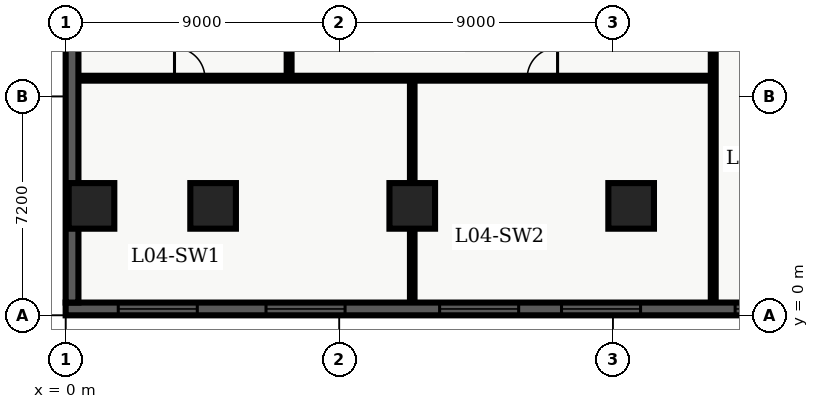
"""IFC4 building model, lengths in metres.
Left out: names, types, materials, properties, quantities, classifications, styles, units other than length and angle.
Written with IfcOpenShell. Run it as: python <this file> out.ifc"""

import sys

from ifc_helpers import new_model, entity, si_unit, converted_unit, direction, frame, origin_with_axes, origin_2d_with_axis, place, context, subcontext, project, spatial, polyline, rectangle, outline, extrude, element, fill, save


model = new_model("IFC4")
c1 = context("Model", 3, precision=1e-05, world=origin_with_axes(), true_north=direction((0.0, 1.0)))
c2 = subcontext(c1, "Body", "Model", "MODEL_VIEW")
j1 = project(units=[si_unit("LENGTHUNIT", "METRE"), converted_unit("PLANEANGLEUNIT", "DEGREE", entity("IfcPlaneAngleMeasure", 0.017), si_unit("PLANEANGLEUNIT", "RADIAN"), dimensions=[0, 0, 0, 0, 0, 0, 0])], contexts=[c1])
p1 = place(None, origin_with_axes())
s1 = spatial("IfcSite", under=j1, at=p1, CompositionType="ELEMENT")
p2 = place(p1, origin_with_axes())
s2 = spatial("IfcBuilding", under=s1, at=p2, CompositionType="ELEMENT")
p3 = place(p2, frame((0.0, 0.0, 19.8), z_axis=(0.0, 0.0, 1.0), x_axis=(1.0, 0.0, 0.0)))
s3 = spatial("IfcBuildingStorey", under=s2, at=p3, CompositionType="ELEMENT", Elevation=19.8)
for number, where, z_axis, x_axis in (
    (1, (11.4, 3.6, 0.0), (0.0, 0.0, 1.0), (1.0, 0.0, 0.0)),
    (2, (18.6, 3.6, 0.0), (0.0, 0.0, 1.0), (1.0, 0.0, 0.0)),
    (3, (4.85, 3.6, 0.0), (0.0, 0.0, 1.0), (1.0, 0.0, 0.0)),
    (4, (0.85, 3.6, 0.0), (0.0, 0.0, 1.0), (1.0, 0.0, 0.0)),
):
    element("IfcColumn", number, at=place(p3, frame(where, z_axis=z_axis, x_axis=x_axis)), inside=s3, PredefinedType="COLUMN", context=c2, shape_type="SweptSolid", body=[
        extrude(rectangle(XDim=1.5, YDim=1.5, at=origin_2d_with_axis()), origin_with_axes(), (0.0, 0.0, 1.0), 4.5),
    ])
p4 = place(p3, frame((0.38, 7.8, 0.0), z_axis=(0.0, 0.0, 1.0), x_axis=(1.0, 0.0, 0.0)))
e5 = element("IfcWall", 5, at=p4, inside=s3, PredefinedType="PARTITIONING", context=c2, shape_type="SweptSolid", body=[
    extrude(outline(polyline([(0.0, -0.08), (20.92, -0.08), (20.92, 0.08), (0.0, 0.08), (0.0, -0.08)])), origin_with_axes(), (0.0, 0.0, 1.0), 3.2),
])
p5 = place(p4, frame((3.7, 0.0, 0.0), z_axis=(0.0, 0.0, 1.0), x_axis=(1.0, 0.0, 0.0)))
e6 = element("IfcOpeningElement", 6, at=p5, cuts=e5, PredefinedType="OPENING", context=c2, shape_type="SweptSolid", body=[
    extrude(rectangle(XDim=1.0, YDim=0.18, at=origin_2d_with_axis()), origin_with_axes(), (0.0, 0.0, 1.0), 2.15),
])
p6 = place(p4, frame((15.3, 0.0, 0.0), z_axis=(0.0, 0.0, 1.0), x_axis=(1.0, 0.0, 0.0)))
e7 = element("IfcOpeningElement", 7, at=p6, cuts=e5, PredefinedType="OPENING", context=c2, shape_type="SweptSolid", body=[
    extrude(rectangle(XDim=1.0, YDim=0.18, at=origin_2d_with_axis()), origin_with_axes(), (0.0, 0.0, 1.0), 2.15),
])
p7 = place(p3, frame((11.4, 0.38, 0.0), z_axis=(0.0, 0.0, 1.0), x_axis=(0.0, 1.0, 0.0)))
e8 = element("IfcWall", 8, at=p7, inside=s3, PredefinedType="PARTITIONING", context=c2, shape_type="SweptSolid", body=[
    extrude(outline(polyline([(0.0, -0.075), (7.42, -0.075), (7.42, 0.075), (0.0, 0.075), (0.0, -0.075)])), origin_with_axes(), (0.0, 0.0, 1.0), 3.2),
])
p8 = place(p3, frame((7.35, 7.8, 0.0), z_axis=(0.0, 0.0, 1.0), x_axis=(0.0, 1.0, 0.0)))
e9 = element("IfcWall", 9, at=p8, inside=s3, PredefinedType="PARTITIONING", context=c2, shape_type="SweptSolid", body=[
    extrude(outline(polyline([(0.0, -0.08), (32.6, -0.08), (32.6, 0.08), (0.0, 0.08), (0.0, -0.08)])), origin_with_axes(), (0.0, 0.0, 1.0), 3.2),
])
p9 = place(p8, frame((8.25, 0.0, 0.0), z_axis=(0.0, 0.0, 1.0), x_axis=(1.0, 0.0, 0.0)))
e10 = element("IfcOpeningElement", 10, at=p9, cuts=e9, PredefinedType="OPENING", context=c2, shape_type="SweptSolid", body=[
    extrude(rectangle(XDim=1.5, YDim=0.18, at=origin_2d_with_axis()), origin_with_axes(), (0.0, 0.0, 1.0), 2.2),
])
p10 = place(p8, frame((21.5, 0.0, 0.0), z_axis=(0.0, 0.0, 1.0), x_axis=(1.0, 0.0, 0.0)))
e11 = element("IfcOpeningElement", 11, at=p10, cuts=e9, PredefinedType="OPENING", context=c2, shape_type="SweptSolid", body=[
    extrude(rectangle(XDim=1.0, YDim=0.18, at=origin_2d_with_axis()), origin_with_axes(), (0.0, 0.0, 1.0), 2.15),
])
p11 = place(p3, frame((21.3, 0.38, 0.0), z_axis=(0.0, 0.0, 1.0), x_axis=(0.0, 1.0, 0.0)))
e12 = element("IfcWall", 12, at=p11, inside=s3, PredefinedType="PARTITIONING", context=c2, shape_type="SweptSolid", body=[
    extrude(outline(polyline([(0.0, -0.08), (35.24, -0.08), (35.24, 0.08), (0.0, 0.08), (0.0, -0.08)])), origin_with_axes(), (0.0, 0.0, 1.0), 3.2),
])
p12 = place(p11, frame((13.025, 0.0, 0.0), z_axis=(0.0, 0.0, 1.0), x_axis=(1.0, 0.0, 0.0)))
e13 = element("IfcOpeningElement", 13, at=p12, cuts=e12, PredefinedType="OPENING", context=c2, shape_type="SweptSolid", body=[
    extrude(rectangle(XDim=1.05, YDim=0.18, at=origin_2d_with_axis()), origin_with_axes(), (0.0, 0.0, 1.0), 2.15),
])
p13 = place(p11, frame((31.25, 0.0, 0.0), z_axis=(0.0, 0.0, 1.0), x_axis=(1.0, 0.0, 0.0)))
e14 = element("IfcOpeningElement", 14, at=p13, cuts=e12, PredefinedType="OPENING", context=c2, shape_type="SweptSolid", body=[
    extrude(rectangle(XDim=1.5, YDim=0.18, at=origin_2d_with_axis()), origin_with_axes(), (0.0, 0.0, 1.0), 2.2),
])
p14 = place(p3, frame((64.38, 0.21, 0.0), z_axis=(0.0, 0.0, 1.0), x_axis=(-1.0, 0.0, 0.0)))
e15 = element("IfcWall", 15, at=p14, inside=s3, PredefinedType="SOLIDWALL", context=c2, shape_type="SweptSolid", body=[
    extrude(outline(polyline([(0.0, -0.21), (64.38, -0.21), (64.38, 0.21), (0.0, 0.21), (0.0, -0.21)])), origin_with_axes(), (0.0, 0.0, 1.0), 4.26),
])
p15 = place(p14, frame((3.03, 0.0, 0.45), z_axis=(0.0, 0.0, 1.0), x_axis=(1.0, 0.0, 0.0)))
e16 = element("IfcOpeningElement", 16, at=p15, cuts=e15, PredefinedType="OPENING", context=c2, shape_type="SweptSolid", body=[
    extrude(rectangle(XDim=2.6, YDim=0.44, at=origin_2d_with_axis()), origin_with_axes(), (0.0, 0.0, 1.0), 2.8),
])
p16 = place(p14, frame((7.89, 0.0, 0.45), z_axis=(0.0, 0.0, 1.0), x_axis=(1.0, 0.0, 0.0)))
e17 = element("IfcOpeningElement", 17, at=p16, cuts=e15, PredefinedType="OPENING", context=c2, shape_type="SweptSolid", body=[
    extrude(rectangle(XDim=2.6, YDim=0.44, at=origin_2d_with_axis()), origin_with_axes(), (0.0, 0.0, 1.0), 2.8),
])
p17 = place(p14, frame((11.9, 0.0, 0.45), z_axis=(0.0, 0.0, 1.0), x_axis=(1.0, 0.0, 0.0)))
e18 = element("IfcOpeningElement", 18, at=p17, cuts=e15, PredefinedType="OPENING", context=c2, shape_type="SweptSolid", body=[
    extrude(rectangle(XDim=2.6, YDim=0.44, at=origin_2d_with_axis()), origin_with_axes(), (0.0, 0.0, 1.0), 2.8),
])
p18 = place(p14, frame((17.61, 0.0, 0.45), z_axis=(0.0, 0.0, 1.0), x_axis=(1.0, 0.0, 0.0)))
e19 = element("IfcOpeningElement", 19, at=p18, cuts=e15, PredefinedType="OPENING", context=c2, shape_type="SweptSolid", body=[
    extrude(rectangle(XDim=2.6, YDim=0.44, at=origin_2d_with_axis()), origin_with_axes(), (0.0, 0.0, 1.0), 2.8),
])
p19 = place(p14, frame((22.47, 0.0, 0.45), z_axis=(0.0, 0.0, 1.0), x_axis=(1.0, 0.0, 0.0)))
e20 = element("IfcOpeningElement", 20, at=p19, cuts=e15, PredefinedType="OPENING", context=c2, shape_type="SweptSolid", body=[
    extrude(rectangle(XDim=2.6, YDim=0.44, at=origin_2d_with_axis()), origin_with_axes(), (0.0, 0.0, 1.0), 2.8),
])
p20 = place(p14, frame((27.33, 0.0, 0.45), z_axis=(0.0, 0.0, 1.0), x_axis=(1.0, 0.0, 0.0)))
e21 = element("IfcOpeningElement", 21, at=p20, cuts=e15, PredefinedType="OPENING", context=c2, shape_type="SweptSolid", body=[
    extrude(rectangle(XDim=2.6, YDim=0.44, at=origin_2d_with_axis()), origin_with_axes(), (0.0, 0.0, 1.0), 2.8),
])
p21 = place(p14, frame((32.19, 0.0, 0.45), z_axis=(0.0, 0.0, 1.0), x_axis=(1.0, 0.0, 0.0)))
e22 = element("IfcOpeningElement", 22, at=p21, cuts=e15, PredefinedType="OPENING", context=c2, shape_type="SweptSolid", body=[
    extrude(rectangle(XDim=2.6, YDim=0.44, at=origin_2d_with_axis()), origin_with_axes(), (0.0, 0.0, 1.0), 2.8),
])
p22 = place(p14, frame((37.05, 0.0, 0.45), z_axis=(0.0, 0.0, 1.0), x_axis=(1.0, 0.0, 0.0)))
e23 = element("IfcOpeningElement", 23, at=p22, cuts=e15, PredefinedType="OPENING", context=c2, shape_type="SweptSolid", body=[
    extrude(rectangle(XDim=2.6, YDim=0.44, at=origin_2d_with_axis()), origin_with_axes(), (0.0, 0.0, 1.0), 2.8),
])
p23 = place(p14, frame((41.06, 0.0, 0.45), z_axis=(0.0, 0.0, 1.0), x_axis=(1.0, 0.0, 0.0)))
e24 = element("IfcOpeningElement", 24, at=p23, cuts=e15, PredefinedType="OPENING", context=c2, shape_type="SweptSolid", body=[
    extrude(rectangle(XDim=2.6, YDim=0.44, at=origin_2d_with_axis()), origin_with_axes(), (0.0, 0.0, 1.0), 2.8),
])
p24 = place(p14, frame((46.77, 0.0, 0.45), z_axis=(0.0, 0.0, 1.0), x_axis=(1.0, 0.0, 0.0)))
e25 = element("IfcOpeningElement", 25, at=p24, cuts=e15, PredefinedType="OPENING", context=c2, shape_type="SweptSolid", body=[
    extrude(rectangle(XDim=2.6, YDim=0.44, at=origin_2d_with_axis()), origin_with_axes(), (0.0, 0.0, 1.0), 2.8),
])
p25 = place(p14, frame((50.78, 0.0, 0.45), z_axis=(0.0, 0.0, 1.0), x_axis=(1.0, 0.0, 0.0)))
e26 = element("IfcOpeningElement", 26, at=p25, cuts=e15, PredefinedType="OPENING", context=c2, shape_type="SweptSolid", body=[
    extrude(rectangle(XDim=2.6, YDim=0.44, at=origin_2d_with_axis()), origin_with_axes(), (0.0, 0.0, 1.0), 2.8),
])
p26 = place(p14, frame((56.49, 0.0, 0.45), z_axis=(0.0, 0.0, 1.0), x_axis=(1.0, 0.0, 0.0)))
e27 = element("IfcOpeningElement", 27, at=p26, cuts=e15, PredefinedType="OPENING", context=c2, shape_type="SweptSolid", body=[
    extrude(rectangle(XDim=2.6, YDim=0.44, at=origin_2d_with_axis()), origin_with_axes(), (0.0, 0.0, 1.0), 2.8),
])
p27 = place(p14, frame((61.35, 0.0, 0.45), z_axis=(0.0, 0.0, 1.0), x_axis=(1.0, 0.0, 0.0)))
e28 = element("IfcOpeningElement", 28, at=p27, cuts=e15, PredefinedType="OPENING", context=c2, shape_type="SweptSolid", body=[
    extrude(rectangle(XDim=2.6, YDim=0.44, at=origin_2d_with_axis()), origin_with_axes(), (0.0, 0.0, 1.0), 2.8),
])
p28 = place(p3, frame((0.21, 0.42, 0.0), z_axis=(0.0, 0.0, 1.0), x_axis=(0.0, 1.0, 0.0)))
e29 = element("IfcWall", 29, at=p28, inside=s3, PredefinedType="SOLIDWALL", context=c2, shape_type="SweptSolid", body=[
    extrude(outline(polyline([(0.0, -0.21), (48.18, -0.21), (48.18, 0.21), (0.0, 0.21), (0.0, -0.21)])), origin_with_axes(), (0.0, 0.0, 1.0), 4.26),
])
p29 = place(p28, frame((13.65, 0.0, 0.45), z_axis=(0.0, 0.0, 1.0), x_axis=(1.0, 0.0, 0.0)))
e30 = element("IfcOpeningElement", 30, at=p29, cuts=e29, PredefinedType="OPENING", context=c2, shape_type="SweptSolid", body=[
    extrude(rectangle(XDim=2.6, YDim=0.44, at=origin_2d_with_axis()), origin_with_axes(), (0.0, 0.0, 1.0), 2.8),
])
p30 = place(p28, frame((24.09, 0.0, 0.45), z_axis=(0.0, 0.0, 1.0), x_axis=(1.0, 0.0, 0.0)))
e31 = element("IfcOpeningElement", 31, at=p30, cuts=e29, PredefinedType="OPENING", context=c2, shape_type="SweptSolid", body=[
    extrude(rectangle(XDim=2.6, YDim=0.44, at=origin_2d_with_axis()), origin_with_axes(), (0.0, 0.0, 1.0), 2.8),
])
p31 = place(p28, frame((28.46, 0.0, 0.45), z_axis=(0.0, 0.0, 1.0), x_axis=(1.0, 0.0, 0.0)))
e32 = element("IfcOpeningElement", 32, at=p31, cuts=e29, PredefinedType="OPENING", context=c2, shape_type="SweptSolid", body=[
    extrude(rectangle(XDim=2.6, YDim=0.44, at=origin_2d_with_axis()), origin_with_axes(), (0.0, 0.0, 1.0), 2.8),
])
p32 = place(p28, frame((34.53, 0.0, 0.45), z_axis=(0.0, 0.0, 1.0), x_axis=(1.0, 0.0, 0.0)))
e33 = element("IfcOpeningElement", 33, at=p32, cuts=e29, PredefinedType="OPENING", context=c2, shape_type="SweptSolid", body=[
    extrude(rectangle(XDim=2.6, YDim=0.44, at=origin_2d_with_axis()), origin_with_axes(), (0.0, 0.0, 1.0), 2.8),
])
p33 = place(p4, frame((3.7, 0.0, 0.0), z_axis=(0.0, 0.0, 1.0), x_axis=(1.0, 0.0, 0.0)))
e34 = element("IfcDoor", 34, at=p33, inside=s3, OperationType="SINGLE_SWING_LEFT", PredefinedType="DOOR", context=c2, shape_type="SweptSolid", body=[
    extrude(rectangle(XDim=1.0, YDim=0.09, at=origin_2d_with_axis()), origin_with_axes(), (0.0, 0.0, 1.0), 2.15),
])
fill(e6, e34)
p34 = place(p4, frame((15.3, 0.0, 0.0), z_axis=(0.0, 0.0, 1.0), x_axis=(1.0, 0.0, 0.0)))
e35 = element("IfcDoor", 35, at=p34, inside=s3, OperationType="SINGLE_SWING_RIGHT", PredefinedType="DOOR", context=c2, shape_type="SweptSolid", body=[
    extrude(rectangle(XDim=1.0, YDim=0.09, at=origin_2d_with_axis()), origin_with_axes(), (0.0, 0.0, 1.0), 2.15),
])
fill(e7, e35)
p35 = place(p14, frame((41.06, 0.0, 0.45), z_axis=(0.0, 0.0, 1.0), x_axis=(1.0, 0.0, 0.0)))
e36 = element("IfcWindow", 36, at=p35, inside=s3, PredefinedType="WINDOW", context=c2, shape_type="SweptSolid", body=[
    extrude(rectangle(XDim=2.6, YDim=0.09, at=origin_2d_with_axis()), origin_with_axes(), (0.0, 0.0, 1.0), 2.8),
])
fill(e24, e36)
p36 = place(p14, frame((46.77, 0.0, 0.45), z_axis=(0.0, 0.0, 1.0), x_axis=(1.0, 0.0, 0.0)))
e37 = element("IfcWindow", 37, at=p36, inside=s3, PredefinedType="WINDOW", context=c2, shape_type="SweptSolid", body=[
    extrude(rectangle(XDim=2.6, YDim=0.09, at=origin_2d_with_axis()), origin_with_axes(), (0.0, 0.0, 1.0), 2.8),
])
fill(e25, e37)
p37 = place(p14, frame((50.78, 0.0, 0.45), z_axis=(0.0, 0.0, 1.0), x_axis=(1.0, 0.0, 0.0)))
e38 = element("IfcWindow", 38, at=p37, inside=s3, PredefinedType="WINDOW", context=c2, shape_type="SweptSolid", body=[
    extrude(rectangle(XDim=2.6, YDim=0.09, at=origin_2d_with_axis()), origin_with_axes(), (0.0, 0.0, 1.0), 2.8),
])
fill(e26, e38)
p38 = place(p14, frame((56.49, 0.0, 0.45), z_axis=(0.0, 0.0, 1.0), x_axis=(1.0, 0.0, 0.0)))
e39 = element("IfcWindow", 39, at=p38, inside=s3, PredefinedType="WINDOW", context=c2, shape_type="SweptSolid", body=[
    extrude(rectangle(XDim=2.6, YDim=0.09, at=origin_2d_with_axis()), origin_with_axes(), (0.0, 0.0, 1.0), 2.8),
])
fill(e27, e39)
p39 = place(p14, frame((61.35, 0.0, 0.45), z_axis=(0.0, 0.0, 1.0), x_axis=(1.0, 0.0, 0.0)))
e40 = element("IfcWindow", 40, at=p39, inside=s3, PredefinedType="WINDOW", context=c2, shape_type="SweptSolid", body=[
    extrude(rectangle(XDim=2.6, YDim=0.09, at=origin_2d_with_axis()), origin_with_axes(), (0.0, 0.0, 1.0), 2.8),
])
fill(e28, e40)
save(model, sys.argv[1])
